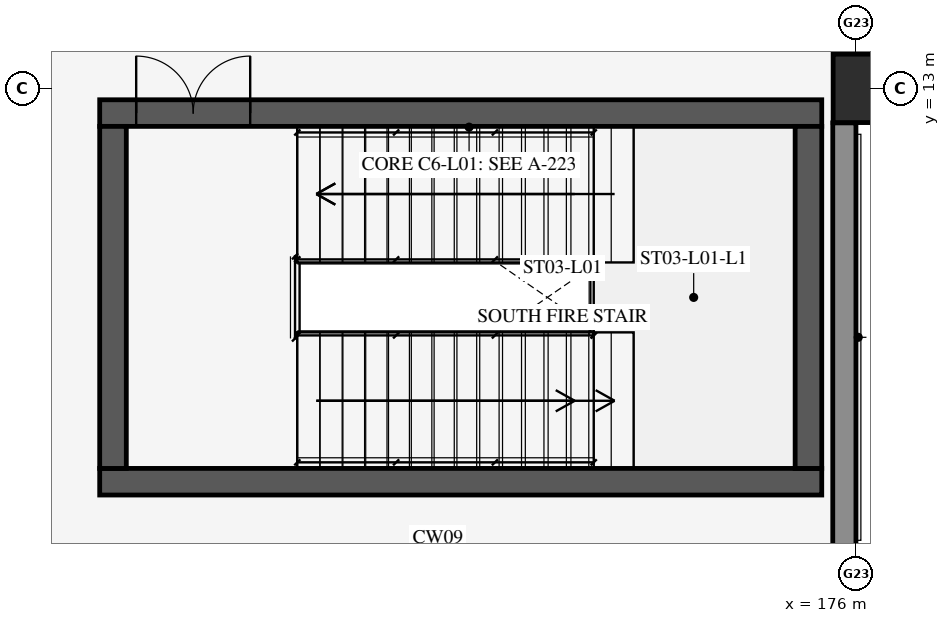
"""IFC4 building model, lengths in metres.
Left out: names, types, materials, properties, quantities, classifications, styles, units other than length and angle.
Written with IfcOpenShell. Run it as: python <this file> out.ifc"""

import sys

from ifc_helpers import new_model, si_unit, direction, frame, frame_2d, origin, origin_2d, place, context, subcontext, project, spatial, rectangle, extrude, element, fill, save


model = new_model("IFC4")
c1 = context("Model", 3, precision=1e-05, world=origin(), true_north=direction((0.0, 1.0)))
c2 = subcontext(c1, "Body", "Model", "MODEL_VIEW")
j1 = project(units=[si_unit("LENGTHUNIT", "METRE"), si_unit("PLANEANGLEUNIT", "RADIAN")], contexts=[c1])
p1 = place(None, origin())
s1 = spatial("IfcSite", under=j1, at=p1, CompositionType="ELEMENT")
p2 = place(p1, origin())
s2 = spatial("IfcBuilding", under=s1, at=p2, CompositionType="ELEMENT")
p3 = place(p2, frame((0.0, 0.0, 5.4)))
s3 = spatial("IfcBuildingStorey", under=s2, at=p3, CompositionType="ELEMENT", Elevation=5.4)
p4 = place(p3, frame((166.05, 7.825, 0.0), z_axis=(0.0, 0.0, 1.0), x_axis=(1.0, 0.0, 0.0)))
e1 = element("IfcWall", 1, at=p4, inside=s3, PredefinedType="SHEAR", context=c2, shape_type="SweptSolid", body=[
    extrude(rectangle(XDim=9.5, YDim=0.35, at=frame_2d((4.75, 0.0))), origin(), (0.0, 0.0, 1.0), 4.56),
])
p5 = place(p3, frame((166.05, 12.675, 0.0), z_axis=(0.0, 0.0, 1.0), x_axis=(1.0, 0.0, 0.0)))
e2 = element("IfcWall", 2, at=p5, inside=s3, PredefinedType="SHEAR", context=c2, shape_type="SweptSolid", body=[
    extrude(rectangle(XDim=9.5, YDim=0.35, at=frame_2d((4.75, 0.0))), origin(), (0.0, 0.0, 1.0), 4.56),
])
p6 = place(p5, frame((0.48, 0.0, 0.0)))
e3 = element("IfcOpeningElement", 3, at=p6, cuts=e2, PredefinedType="OPENING", context=c2, shape_type="SweptSolid", body=[
    extrude(rectangle(XDim=1.5, YDim=2.3, at=frame_2d((0.75, 1.15))), frame((0.0, 0.187, 0.0), z_axis=(0.0, -1.0, 0.0), x_axis=(1.0, 0.0, 0.0)), (0.0, 0.0, 1.0), 0.374),
])
for number, where, z_axis, x_axis in (
    (4, (166.225, 8.0, 0.0), (0.0, 0.0, 1.0), (0.0, 1.0, 0.0)),
    (5, (175.375, 8.0, 0.0), (0.0, 0.0, 1.0), (0.0, 1.0, 0.0)),
):
    element("IfcWall", number, at=place(p3, frame(where, z_axis=z_axis, x_axis=x_axis)), inside=s3, PredefinedType="SHEAR", context=c2, shape_type="SweptSolid", body=[
        extrude(rectangle(XDim=4.5, YDim=0.35, at=frame_2d((2.25, 0.0))), origin(), (0.0, 0.0, 1.0), 4.56),
    ])
p7 = place(p3, frame((176.0, 13.0, 0.0), z_axis=(0.0, 0.0, 1.0), x_axis=(1.0, 0.0, 0.0)))
e6 = element("IfcColumn", 6, at=p7, inside=s3, PredefinedType="COLUMN", context=c2, shape_type="SweptSolid", body=[
    extrude(rectangle(XDim=0.6, YDim=0.9, at=origin_2d()), origin(), (0.0, 0.0, 1.0), 4.8),
])
p8 = place(p3, frame((175.847, 6.904, 0.0), z_axis=(0.0, 0.0, 1.0), x_axis=(0.0, 1.0, 0.0)))
e7 = element("IfcWall", 7, at=p8, inside=s3, PredefinedType="SOLIDWALL", context=c2, shape_type="SweptSolid", body=[
    extrude(rectangle(XDim=5.642, YDim=0.305, at=frame_2d((2.821, 0.0))), origin(), (0.0, 0.0, 1.0), 3.994),
])
p9 = place(p6, frame((1.5, 0.0, 0.0), z_axis=(0.0, 0.0, 1.0), x_axis=(-1.0, 0.0, 0.0)))
e8 = element("IfcDoor", 8, at=p9, inside=s3, OperationType="DOUBLE_DOOR_SINGLE_SWING", PredefinedType="DOOR", context=c2, shape_type="SweptSolid", body=[
    extrude(rectangle(XDim=1.5, YDim=2.3, at=frame_2d((0.75, 1.15))), frame((0.0, 0.025, 0.0), z_axis=(0.0, -1.0, 0.0), x_axis=(1.0, 0.0, 0.0)), (0.0, 0.0, 1.0), 0.05),
])
fill(e3, e8)
save(model, sys.argv[1])
